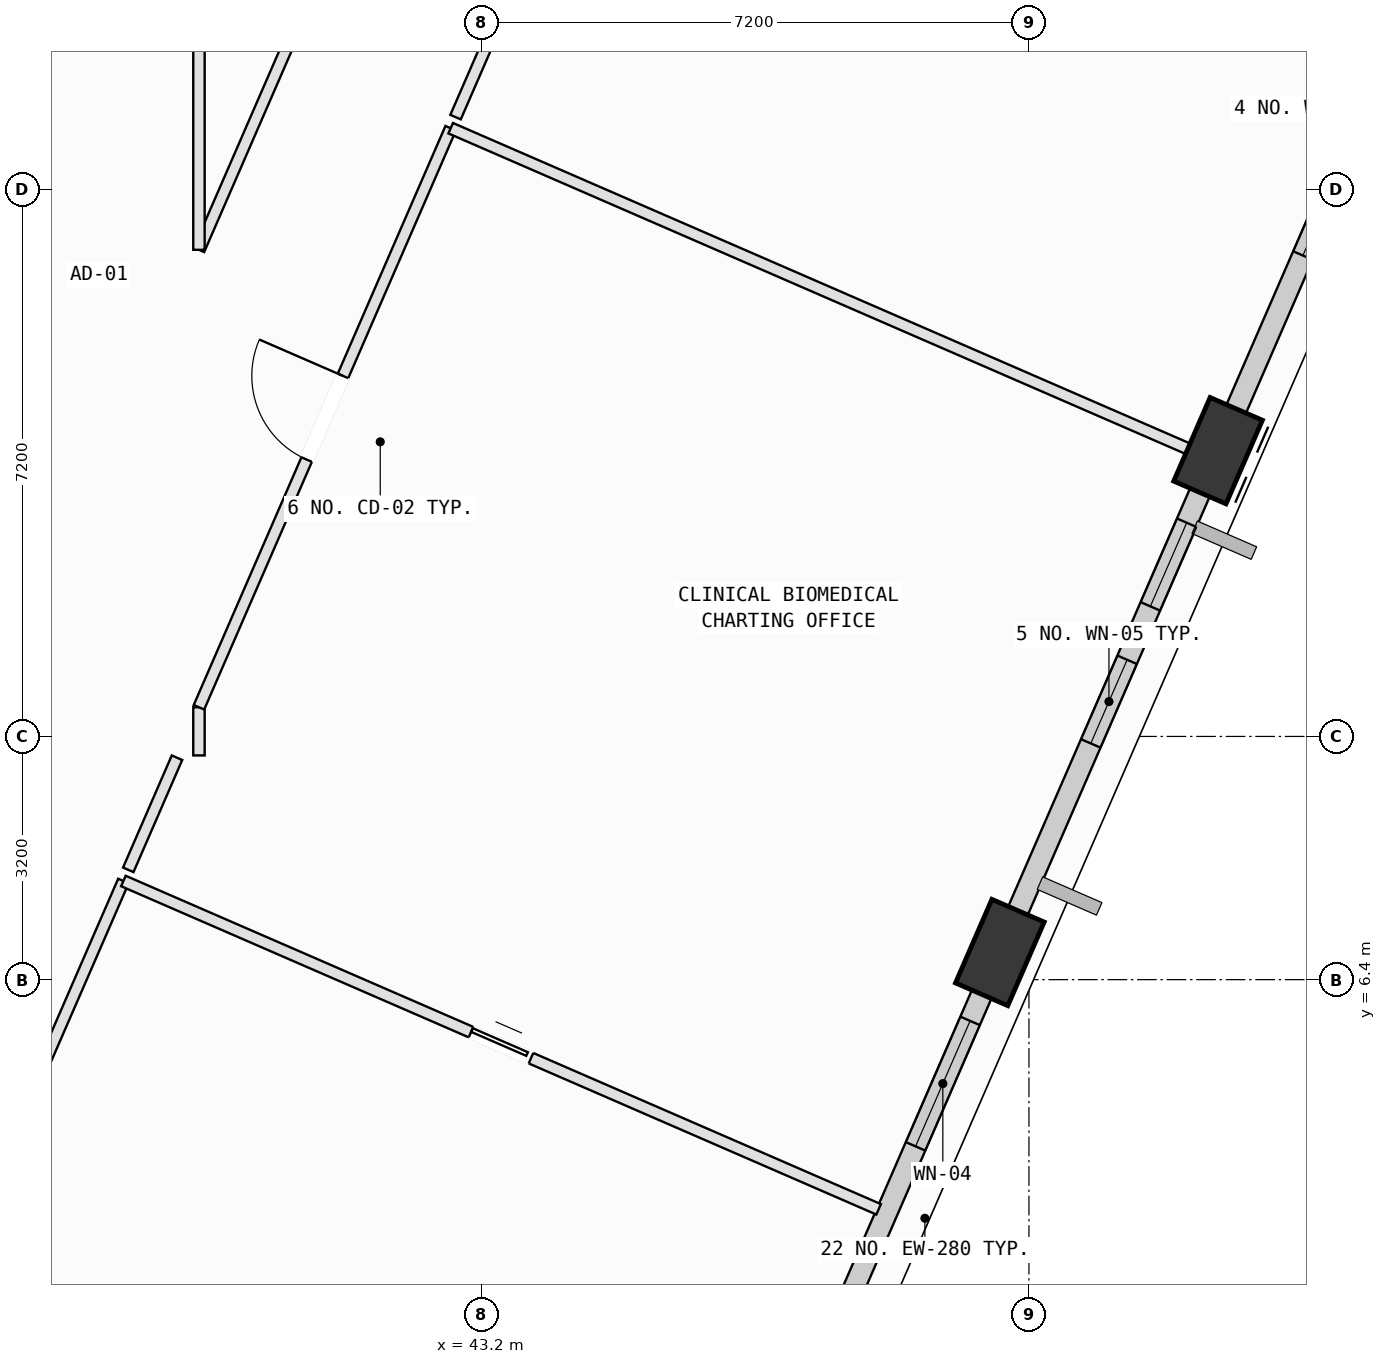
"""IFC4 building model, lengths in metres.
Left out: names, types, materials, properties, quantities, classifications, styles, units other than length and angle.
Written with IfcOpenShell. Run it as: python <this file> out.ifc"""

import sys

from ifc_helpers import new_model, si_unit, direction, frame, frame_2d, origin, origin_2d, place, context, subcontext, project, spatial, rectangle, extrude, element, fill, save


model = new_model("IFC4")
c1 = context("Model", 3, precision=1e-05, world=origin(), true_north=direction((0.0, 1.0)))
c2 = subcontext(c1, "Body", "Model", "MODEL_VIEW")
j1 = project(units=[si_unit("LENGTHUNIT", "METRE"), si_unit("PLANEANGLEUNIT", "RADIAN")], contexts=[c1])
p1 = place(None, origin())
s1 = spatial("IfcSite", under=j1, at=p1, CompositionType="ELEMENT")
p2 = place(p1, origin())
s2 = spatial("IfcBuilding", under=s1, at=p2, CompositionType="ELEMENT")
p3 = place(p2, frame((0.0, 0.0, 316.6)))
s3 = spatial("IfcBuildingStorey", under=s2, at=p3, CompositionType="ELEMENT", Elevation=316.6)
for number, where, z_axis, x_axis in (
    (1, (50.017, 6.757, 0.002), (0.0, 0.0, 1.0), (0.399, 0.917, 0.0)),
    (2, (52.888, 13.36, 0.002), (0.0, 0.0, 1.0), (0.399, 0.917, 0.0)),
):
    element("IfcColumn", number, at=place(p3, frame(where, z_axis=z_axis, x_axis=x_axis)), inside=s3, PredefinedType="COLUMN", context=c2, shape_type="SweptSolid", body=[
        extrude(rectangle(XDim=1.2, YDim=0.75, at=origin_2d()), origin(), (0.0, 0.0, 1.0), 3.996),
    ])
p4 = place(p3, frame((49.859, 6.393, 0.0), z_axis=(0.0, 0.0, 1.0), x_axis=(-0.398758169539, -0.917056117272, 0.0)))
e3 = element("IfcWall", 3, at=p4, inside=s3, PredefinedType="SOLIDWALL", context=c2, shape_type="SweptSolid", body=[
    extrude(rectangle(XDim=6.405, YDim=0.28, at=frame_2d((3.202, 0.0))), origin(), (0.0, 0.0, 1.0), 3.245),
])
p5 = place(p4, frame((0.584, 0.0, 0.75)))
e4 = element("IfcOpeningElement", 4, at=p5, cuts=e3, PredefinedType="OPENING", context=c2, shape_type="SweptSolid", body=[
    extrude(rectangle(XDim=1.8, YDim=2.05, at=frame_2d((0.9, 1.025))), frame((0.0, 0.15, 0.0), z_axis=(0.0, -1.0, 0.0), x_axis=(1.0, 0.0, 0.0)), (0.0, 0.0, 1.0), 0.3),
])
p6 = place(p3, frame((52.729, 12.996, 0.0), z_axis=(0.0, 0.0, 1.0), x_axis=(-0.398744230651, -0.917062178112, 0.0)))
e5 = element("IfcWall", 5, at=p6, inside=s3, PredefinedType="SOLIDWALL", context=c2, shape_type="SweptSolid", body=[
    extrude(rectangle(XDim=6.405, YDim=0.28, at=frame_2d((3.203, 0.0))), origin(), (0.0, 0.0, 1.0), 3.245),
])
p7 = place(p6, frame((2.603, 0.0, 0.75)))
e6 = element("IfcOpeningElement", 6, at=p7, cuts=e5, PredefinedType="OPENING", context=c2, shape_type="SweptSolid", body=[
    extrude(rectangle(XDim=1.2, YDim=1.75, at=frame_2d((0.6, 0.875))), frame((0.0, 0.15, 0.0), z_axis=(0.0, -1.0, 0.0), x_axis=(1.0, 0.0, 0.0)), (0.0, 0.0, 1.0), 0.3),
])
p8 = place(p6, frame((0.636, 0.0, 0.75)))
e7 = element("IfcOpeningElement", 7, at=p8, cuts=e5, PredefinedType="OPENING", context=c2, shape_type="SweptSolid", body=[
    extrude(rectangle(XDim=1.2, YDim=1.75, at=frame_2d((0.6, 0.875))), frame((0.0, 0.15, 0.0), z_axis=(0.0, -1.0, 0.0), x_axis=(1.0, 0.0, 0.0)), (0.0, 0.0, 1.0), 0.3),
])
p9 = place(p3, frame((55.601, 19.598, 0.0), z_axis=(0.0, 0.0, 1.0), x_axis=(-0.398744230651, -0.917062178112, 0.0)))
e8 = element("IfcWall", 8, at=p9, inside=s3, PredefinedType="SOLIDWALL", context=c2, shape_type="SweptSolid", body=[
    extrude(rectangle(XDim=6.405, YDim=0.28, at=frame_2d((3.203, 0.0))), origin(), (0.0, 0.0, 1.0), 3.245),
])
p10 = place(p9, frame((2.402, 0.0, 0.75)))
e9 = element("IfcOpeningElement", 9, at=p10, cuts=e8, PredefinedType="OPENING", context=c2, shape_type="SweptSolid", body=[
    extrude(rectangle(XDim=1.6, YDim=1.95, at=frame_2d((0.8, 0.975))), frame((0.0, 0.15, 0.0), z_axis=(0.0, -1.0, 0.0), x_axis=(1.0, 0.0, 0.0)), (0.0, 0.0, 1.0), 0.3),
])
p11 = place(p3, frame((33.286, -4.26, 0.0), z_axis=(0.0, 0.0, 1.0), x_axis=(0.398794571869, 0.9170402878, 0.0)))
e10 = element("IfcWall", 10, at=p11, inside=s3, PredefinedType="PARTITIONING", context=c2, shape_type="SweptSolid", body=[
    extrude(rectangle(XDim=13.04, YDim=0.15, at=frame_2d((6.52, 0.0))), origin(), (0.0, 0.0, 1.0), 2.765),
])
p12 = place(p3, frame((38.486, 7.698, 0.0), z_axis=(0.0, 0.0, 1.0), x_axis=(0.917068265028, -0.398730231207, 0.0)))
e11 = element("IfcWall", 11, at=p12, inside=s3, PredefinedType="PARTITIONING", context=c2, shape_type="SweptSolid", body=[
    extrude(rectangle(XDim=10.834, YDim=0.15, at=frame_2d((5.417, 0.0))), origin(), (0.0, 0.0, 1.0), 2.745),
])
p13 = place(p12, frame((4.987, 0.0, 0.0)))
e12 = element("IfcOpeningElement", 12, at=p13, cuts=e11, PredefinedType="OPENING", context=c2, shape_type="SweptSolid", body=[
    extrude(rectangle(XDim=0.86, YDim=2.06, at=frame_2d((0.43, 1.03))), frame((0.0, 0.085, 0.0), z_axis=(0.0, -1.0, 0.0), x_axis=(1.0, 0.0, 0.0)), (0.0, 0.0, 1.0), 0.17),
])
p14 = place(p3, frame((39.48, 9.35, 0.0), z_axis=(0.0, 0.0, 1.0), x_axis=(0.0, 1.0, 0.0)))
e13 = element("IfcWall", 13, at=p14, inside=s3, PredefinedType="PARTITIONING", context=c2, shape_type="SweptSolid", body=[
    extrude(rectangle(XDim=0.634, YDim=0.15, at=frame_2d((0.317, 0.0))), origin(), (0.0, 0.0, 1.0), 3.78),
])
p15 = place(p3, frame((39.48, 9.984, 0.0), z_axis=(0.0, 0.0, 1.0), x_axis=(0.398659488131, 0.917099020021, 0.0)))
e14 = element("IfcWall", 14, at=p15, inside=s3, PredefinedType="PARTITIONING", context=c2, shape_type="SweptSolid", body=[
    extrude(rectangle(XDim=8.308, YDim=0.15, at=frame_2d((4.154, 0.0))), origin(), (0.0, 0.0, 1.0), 3.78),
])
p16 = place(p15, frame((3.554, 0.0, 0.0)))
e15 = element("IfcOpeningElement", 15, at=p16, cuts=e14, PredefinedType="OPENING", context=c2, shape_type="SweptSolid", body=[
    extrude(rectangle(XDim=1.2, YDim=2.15, at=frame_2d((0.6, 1.075))), frame((0.0, 0.085, 0.0), z_axis=(0.0, -1.0, 0.0), x_axis=(1.0, 0.0, 0.0)), (0.0, 0.0, 1.0), 0.17),
])
p17 = place(p3, frame((42.792, 17.603, 0.0), z_axis=(0.0, 0.0, 1.0), x_axis=(0.917063112739, -0.398742081117, 0.0)))
e16 = element("IfcWall", 16, at=p17, inside=s3, PredefinedType="PARTITIONING", context=c2, shape_type="SweptSolid", body=[
    extrude(rectangle(XDim=11.18, YDim=0.15, at=frame_2d((5.59, 0.0))), origin(), (0.0, 0.0, 1.0), 3.78),
])
p18 = place(p3, frame((50.386, 7.03, 0.0), z_axis=(0.0, 0.0, 1.0), x_axis=(-0.398658726612, -0.91709935105, 0.0)))
e17 = element("IfcWall", 17, at=p18, inside=s3, PredefinedType="PARTITIONING", context=c2, shape_type="SweptSolid", body=[
    extrude(rectangle(XDim=0.795, YDim=0.15, at=frame_2d((0.397, 0.0))), origin(), (0.0, 0.0, 1.0), 3.245),
])
p19 = place(p3, frame((38.55, 7.845, 0.0), z_axis=(0.0, 0.0, 1.0), x_axis=(0.398476313607, 0.917178623548, 0.0)))
e18 = element("IfcWall", 18, at=p19, inside=s3, PredefinedType="PARTITIONING", context=c2, shape_type="SweptSolid", body=[
    extrude(rectangle(XDim=1.608, YDim=0.15, at=frame_2d((0.804, 0.0))), origin(), (0.0, 0.0, 1.0), 3.78),
])
p20 = place(p3, frame((42.856, 17.749, 0.0), z_axis=(0.0, 0.0, 1.0), x_axis=(0.398751440491, 0.917059043195, 0.0)))
e19 = element("IfcWall", 19, at=p20, inside=s3, PredefinedType="PARTITIONING", context=c2, shape_type="SweptSolid", body=[
    extrude(rectangle(XDim=13.041, YDim=0.15, at=frame_2d((6.52, 0.0))), origin(), (0.0, 0.0, 1.0), 3.78),
])
p21 = place(p20, frame((5.92, 0.0, 0.0)))
e20 = element("IfcOpeningElement", 20, at=p21, cuts=e19, PredefinedType="OPENING", context=c2, shape_type="SweptSolid", body=[
    extrude(rectangle(XDim=1.2, YDim=2.15, at=frame_2d((0.6, 1.075))), frame((0.0, 0.085, 0.0), z_axis=(0.0, -1.0, 0.0), x_axis=(1.0, 0.0, 0.0)), (0.0, 0.0, 1.0), 0.17),
])
p22 = place(p3, frame((41.117, 19.768, 0.0), z_axis=(0.0, 0.0, 1.0), x_axis=(-0.398715239341, -0.917074783165, 0.0)))
e21 = element("IfcWall", 21, at=p22, inside=s3, PredefinedType="PARTITIONING", context=c2, shape_type="SweptSolid", body=[
    extrude(rectangle(XDim=4.106, YDim=0.15, at=frame_2d((2.053, 0.0))), origin(), (0.0, 0.0, 1.0), 3.78),
])
p23 = place(p3, frame((39.48, 16.003, 0.0), z_axis=(0.0, 0.0, 1.0), x_axis=(0.0, 1.0, 0.0)))
e22 = element("IfcWall", 22, at=p23, inside=s3, PredefinedType="PARTITIONING", context=c2, shape_type="SweptSolid", body=[
    extrude(rectangle(XDim=4.2, YDim=0.15, at=frame_2d((2.1, 0.0))), origin(), (0.0, 0.0, 1.0), 3.78),
])
p24 = place(p5, origin())
e23 = element("IfcWindow", 23, at=p24, inside=s3, PartitioningType="SINGLE_PANEL", PredefinedType="WINDOW", context=c2, shape_type="SweptSolid", body=[
    extrude(rectangle(XDim=1.8, YDim=2.05, at=frame_2d((0.9, 1.025))), frame((0.0, 0.03, 0.0), z_axis=(0.0, -1.0, 0.0), x_axis=(1.0, 0.0, 0.0)), (0.0, 0.0, 1.0), 0.06),
])
fill(e4, e23)
p25 = place(p7, origin())
e24 = element("IfcWindow", 24, at=p25, inside=s3, PartitioningType="SINGLE_PANEL", PredefinedType="WINDOW", context=c2, shape_type="SweptSolid", body=[
    extrude(rectangle(XDim=1.2, YDim=1.75, at=frame_2d((0.6, 0.875))), frame((0.0, 0.03, 0.0), z_axis=(0.0, -1.0, 0.0), x_axis=(1.0, 0.0, 0.0)), (0.0, 0.0, 1.0), 0.06),
])
fill(e6, e24)
p26 = place(p8, origin())
e25 = element("IfcWindow", 25, at=p26, inside=s3, PartitioningType="SINGLE_PANEL", PredefinedType="WINDOW", context=c2, shape_type="SweptSolid", body=[
    extrude(rectangle(XDim=1.2, YDim=1.75, at=frame_2d((0.6, 0.875))), frame((0.0, 0.03, 0.0), z_axis=(0.0, -1.0, 0.0), x_axis=(1.0, 0.0, 0.0)), (0.0, 0.0, 1.0), 0.06),
])
fill(e7, e25)
p27 = place(p10, origin())
e26 = element("IfcWindow", 26, at=p27, inside=s3, PartitioningType="SINGLE_PANEL", PredefinedType="WINDOW", context=c2, shape_type="SweptSolid", body=[
    extrude(rectangle(XDim=1.6, YDim=1.95, at=frame_2d((0.8, 0.975))), frame((0.0, 0.03, 0.0), z_axis=(0.0, -1.0, 0.0), x_axis=(1.0, 0.0, 0.0)), (0.0, 0.0, 1.0), 0.06),
])
fill(e9, e26)
p28 = place(p16, origin())
e27 = element("IfcDoor", 27, at=p28, inside=s3, OperationType="SINGLE_SWING_RIGHT", PredefinedType="DOOR", context=c2, shape_type="SweptSolid", body=[
    extrude(rectangle(XDim=1.2, YDim=2.15, at=frame_2d((0.6, 1.075))), frame((0.0, 0.025, 0.0), z_axis=(0.0, -1.0, 0.0), x_axis=(1.0, 0.0, 0.0)), (0.0, 0.0, 1.0), 0.05),
])
fill(e15, e27)
p29 = place(p13, origin())
e28 = element("IfcDoor", 28, at=p29, inside=s3, OperationType="SLIDING_TO_LEFT", PredefinedType="DOOR", context=c2, shape_type="SweptSolid", body=[
    extrude(rectangle(XDim=0.86, YDim=2.06, at=frame_2d((0.43, 1.03))), frame((0.0, 0.025, 0.0), z_axis=(0.0, -1.0, 0.0), x_axis=(1.0, 0.0, 0.0)), (0.0, 0.0, 1.0), 0.05),
])
fill(e12, e28)
save(model, sys.argv[1])
